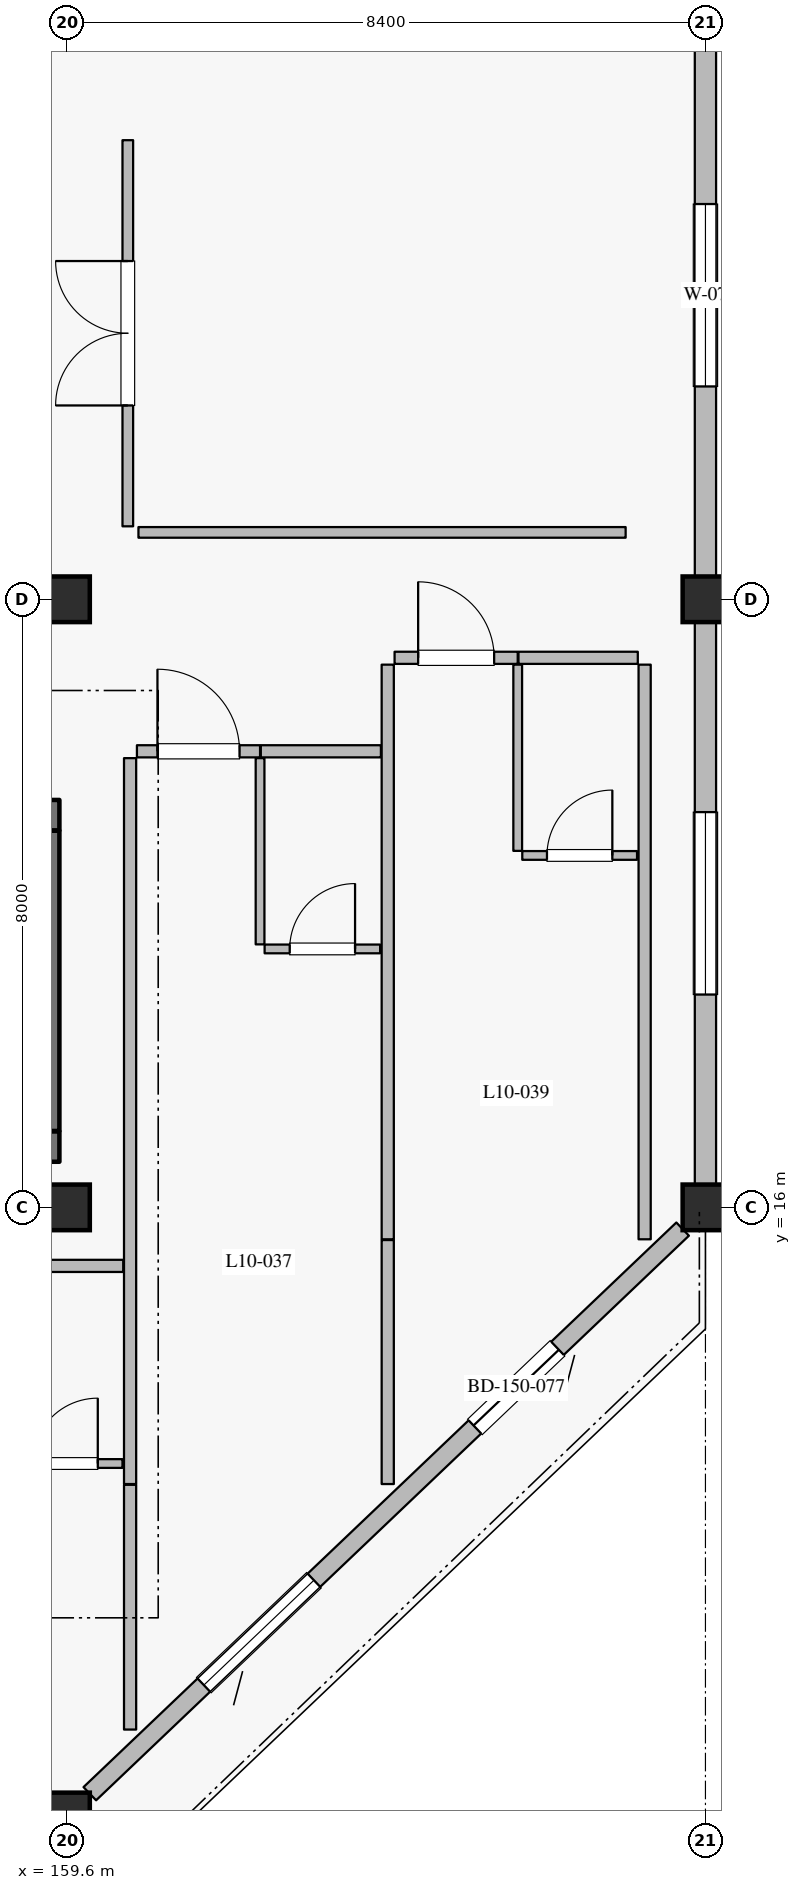
"""IFC4 building model, lengths in metres.
Left out: names, types, materials, properties, quantities, classifications, styles, units other than length and angle.
Written with IfcOpenShell. Run it as: python <this file> out.ifc"""

import sys

from ifc_helpers import new_model, si_unit, direction, frame, frame_2d, origin, origin_2d, place, context, subcontext, project, spatial, rectangle, extrude, element, fill, save


model = new_model("IFC4")
c1 = context("Model", 3, precision=1e-05, world=origin(), true_north=direction((0.0, 1.0)))
c2 = subcontext(c1, "Body", "Model", "MODEL_VIEW")
j1 = project(units=[si_unit("LENGTHUNIT", "METRE"), si_unit("PLANEANGLEUNIT", "RADIAN")], contexts=[c1])
p1 = place(None, origin())
s1 = spatial("IfcSite", under=j1, at=p1, CompositionType="ELEMENT")
p2 = place(p1, origin())
s2 = spatial("IfcBuilding", under=s1, at=p2, CompositionType="ELEMENT")
p3 = place(p2, frame((0.0, 0.0, 43.2)))
s3 = spatial("IfcBuildingStorey", under=s2, at=p3, CompositionType="ELEMENT", Elevation=43.2)
for number, where, z_axis, x_axis in (
    (1, (159.6, 8.0, 0.0), (0.0, 0.0, 1.0), (1.0, 0.0, 0.0)),
    (2, (159.6, 24.0, 0.0), (0.0, 0.0, 1.0), (1.0, 0.0, 0.0)),
    (3, (168.0, 16.0, 0.0), (0.0, 0.0, 1.0), (1.0, 0.0, 0.0)),
    (4, (159.6, 16.0, 0.0), (0.0, 0.0, 1.0), (1.0, 0.0, 0.0)),
    (5, (168.0, 24.0, 0.0), (0.0, 0.0, 1.0), (1.0, 0.0, 0.0)),
):
    element("IfcColumn", number, at=place(p3, frame(where, z_axis=z_axis, x_axis=x_axis)), inside=s3, PredefinedType="COLUMN", context=c2, shape_type="SweptSolid", body=[
        extrude(rectangle(XDim=0.6, YDim=0.6, at=origin_2d()), origin(), (0.0, 0.0, 1.0), 4.2),
    ])
p4 = place(p3, frame((167.7, 15.714, 0.0), z_axis=(0.0, 0.0, 1.0), x_axis=(-0.724156257633, -0.689635928973, 0.0)))
e6 = element("IfcWall", 6, at=p4, inside=s3, PredefinedType="SOLIDWALL", context=c2, shape_type="SweptSolid", body=[
    extrude(rectangle(XDim=10.771, YDim=0.24, at=frame_2d((5.386, 0.0))), origin(), (0.0, 0.0, 1.0), 3.49),
])
p5 = place(p4, frame((2.274, 0.0, 0.0)))
e7 = element("IfcOpeningElement", 7, at=p5, cuts=e6, PredefinedType="OPENING", context=c2, shape_type="SweptSolid", body=[
    extrude(rectangle(XDim=1.5, YDim=2.25, at=frame_2d((0.75, 1.125))), frame((0.0, 0.13, 0.0), z_axis=(0.0, -1.0, 0.0), x_axis=(1.0, 0.0, 0.0)), (0.0, 0.0, 1.0), 0.26),
])
p6 = place(p4, frame((6.699, 0.0, 0.8)))
e8 = element("IfcOpeningElement", 8, at=p6, cuts=e6, PredefinedType="OPENING", context=c2, shape_type="SweptSolid", body=[
    extrude(rectangle(XDim=2.0, YDim=1.75, at=frame_2d((1.0, 0.875))), frame((0.0, 0.13, 0.0), z_axis=(0.0, -1.0, 0.0), x_axis=(1.0, 0.0, 0.0)), (0.0, 0.0, 1.0), 0.26),
])
p7 = place(p3, frame((168.0, 31.7, 0.0), z_axis=(0.0, 0.0, 1.0), x_axis=(0.0, -1.0, 0.0)))
e9 = element("IfcWall", 9, at=p7, inside=s3, PredefinedType="SOLIDWALL", context=c2, shape_type="SweptSolid", body=[
    extrude(rectangle(XDim=7.4, YDim=0.28, at=frame_2d((3.7, 0.0))), origin(), (0.0, 0.0, 1.0), 3.3),
])
p8 = place(p7, frame((2.5, 0.0, 0.75)))
e10 = element("IfcOpeningElement", 10, at=p8, cuts=e9, PredefinedType="OPENING", context=c2, shape_type="SweptSolid", body=[
    extrude(rectangle(XDim=2.4, YDim=1.65, at=frame_2d((1.2, 0.825))), frame((0.0, 0.15, 0.0), z_axis=(0.0, -1.0, 0.0), x_axis=(1.0, 0.0, 0.0)), (0.0, 0.0, 1.0), 0.3),
])
p9 = place(p3, frame((168.0, 23.7, 0.0), z_axis=(0.0, 0.0, 1.0), x_axis=(0.0, -1.0, 0.0)))
e11 = element("IfcWall", 11, at=p9, inside=s3, PredefinedType="SOLIDWALL", context=c2, shape_type="SweptSolid", body=[
    extrude(rectangle(XDim=7.4, YDim=0.28, at=frame_2d((3.7, 0.0))), origin(), (0.0, 0.0, 1.0), 3.3),
])
p10 = place(p9, frame((2.5, 0.0, 0.75)))
e12 = element("IfcOpeningElement", 12, at=p10, cuts=e11, PredefinedType="OPENING", context=c2, shape_type="SweptSolid", body=[
    extrude(rectangle(XDim=2.4, YDim=1.65, at=frame_2d((1.2, 0.825))), frame((0.0, 0.15, 0.0), z_axis=(0.0, -1.0, 0.0), x_axis=(1.0, 0.0, 0.0)), (0.0, 0.0, 1.0), 0.3),
])
p11 = place(p3, frame((151.3, 16.8, 0.0), z_axis=(0.0, 0.0, 1.0), x_axis=(1.0, 0.0, 0.0)))
e13 = element("IfcWall", 13, at=p11, inside=s3, PredefinedType="SHEAR", context=c2, shape_type="SweptSolid", body=[
    extrude(rectangle(XDim=8.2, YDim=0.4, at=frame_2d((4.1, 0.0))), origin(), (0.0, 0.0, 1.0), 3.935),
])
p12 = place(p3, frame((159.3, 17.005, 0.0), z_axis=(0.0, 0.0, 1.0), x_axis=(0.0, 1.0, 0.0)))
e14 = element("IfcWall", 14, at=p12, inside=s3, PredefinedType="SHEAR", context=c2, shape_type="SweptSolid", body=[
    extrude(rectangle(XDim=3.95, YDim=0.4, at=frame_2d((1.975, 0.0))), origin(), (0.0, 0.0, 1.0), 3.935),
])
p13 = place(p3, frame((151.3, 21.16, 0.0), z_axis=(0.0, 0.0, 1.0), x_axis=(1.0, 0.0, 0.0)))
e15 = element("IfcWall", 15, at=p13, inside=s3, PredefinedType="SHEAR", context=c2, shape_type="SweptSolid", body=[
    extrude(rectangle(XDim=8.2, YDim=0.4, at=frame_2d((4.1, 0.0))), origin(), (0.0, 0.0, 1.0), 3.935),
])
p14 = place(p13, frame((0.43, 0.0, 0.0)))
e16 = element("IfcOpeningElement", 16, at=p14, cuts=e15, PredefinedType="OPENING", context=c2, shape_type="SweptSolid", body=[
    extrude(rectangle(XDim=1.16, YDim=2.2, at=frame_2d((0.58, 1.1))), frame((0.0, 0.21, 0.0), z_axis=(0.0, -1.0, 0.0), x_axis=(1.0, 0.0, 0.0)), (0.0, 0.0, 1.0), 0.42),
])
p15 = place(p3, frame((158.77, 15.23, 0.0), z_axis=(0.0, 0.0, 1.0), x_axis=(1.0, 0.0, 0.0)))
e17 = element("IfcWall", 17, at=p15, inside=s3, PredefinedType="PARTITIONING", context=c2, shape_type="SweptSolid", body=[
    extrude(rectangle(XDim=1.57, YDim=0.16, at=frame_2d((0.785, 0.0))), origin(), (0.0, 0.0, 1.0), 3.935),
])
p16 = place(p3, frame((158.82, 12.63, 0.0), z_axis=(0.0, 0.0, 1.0), x_axis=(1.0, 0.0, 0.0)))
e18 = element("IfcWall", 18, at=p16, inside=s3, PredefinedType="PARTITIONING", context=c2, shape_type="SweptSolid", body=[
    extrude(rectangle(XDim=1.51, YDim=0.115, at=frame_2d((0.755, 0.0))), origin(), (0.0, 0.0, 1.0), 3.935),
])
p17 = place(p16, frame((0.325, 0.0, 0.0)))
e19 = element("IfcOpeningElement", 19, at=p17, cuts=e18, PredefinedType="OPENING", context=c2, shape_type="SweptSolid", body=[
    extrude(rectangle(XDim=0.86, YDim=2.12, at=frame_2d((0.43, 1.06))), frame((0.0, 0.067, 0.0), z_axis=(0.0, -1.0, 0.0), x_axis=(1.0, 0.0, 0.0)), (0.0, 0.0, 1.0), 0.135),
])
p18 = place(p3, frame((160.43, 9.13, 0.0), z_axis=(0.0, 0.0, 1.0), x_axis=(0.0, 1.0, 0.0)))
e20 = element("IfcWall", 20, at=p18, inside=s3, PredefinedType="PARTITIONING", context=c2, shape_type="SweptSolid", body=[
    extrude(rectangle(XDim=3.22, YDim=0.16, at=frame_2d((1.61, 0.0))), origin(), (0.0, 0.0, 1.0), 3.935),
])
p19 = place(p3, frame((160.52, 22.0, 0.0), z_axis=(0.0, 0.0, 1.0), x_axis=(1.0, 0.0, 0.0)))
e21 = element("IfcWall", 21, at=p19, inside=s3, PredefinedType="PARTITIONING", context=c2, shape_type="SweptSolid", body=[
    extrude(rectangle(XDim=1.62, YDim=0.16, at=frame_2d((0.81, 0.0))), origin(), (0.0, 0.0, 1.0), 3.935),
])
p20 = place(p19, frame((0.27, 0.0, 0.0)))
e22 = element("IfcOpeningElement", 22, at=p20, cuts=e21, PredefinedType="OPENING", context=c2, shape_type="SweptSolid", body=[
    extrude(rectangle(XDim=1.08, YDim=2.3, at=frame_2d((0.54, 1.15))), frame((0.0, 0.09, 0.0), z_axis=(0.0, -1.0, 0.0), x_axis=(1.0, 0.0, 0.0)), (0.0, 0.0, 1.0), 0.18),
])
p21 = place(p3, frame((162.15, 22.0, 0.0), z_axis=(0.0, 0.0, 1.0), x_axis=(1.0, 0.0, 0.0)))
e23 = element("IfcWall", 23, at=p21, inside=s3, PredefinedType="PARTITIONING", context=c2, shape_type="SweptSolid", body=[
    extrude(rectangle(XDim=1.58, YDim=0.16, at=frame_2d((0.79, 0.0))), origin(), (0.0, 0.0, 1.0), 3.935),
])
p22 = place(p3, frame((162.14, 19.46, 0.0), z_axis=(0.0, 0.0, 1.0), x_axis=(0.0, 1.0, 0.0)))
e24 = element("IfcWall", 24, at=p22, inside=s3, PredefinedType="PARTITIONING", context=c2, shape_type="SweptSolid", body=[
    extrude(rectangle(XDim=2.45, YDim=0.115, at=frame_2d((1.225, 0.0))), origin(), (0.0, 0.0, 1.0), 3.935),
])
p23 = place(p3, frame((162.2, 19.4, 0.0), z_axis=(0.0, 0.0, 1.0), x_axis=(1.0, 0.0, 0.0)))
e25 = element("IfcWall", 25, at=p23, inside=s3, PredefinedType="PARTITIONING", context=c2, shape_type="SweptSolid", body=[
    extrude(rectangle(XDim=1.52, YDim=0.115, at=frame_2d((0.76, 0.0))), origin(), (0.0, 0.0, 1.0), 3.935),
])
p24 = place(p23, frame((0.33, 0.0, 0.0)))
e26 = element("IfcOpeningElement", 26, at=p24, cuts=e25, PredefinedType="OPENING", context=c2, shape_type="SweptSolid", body=[
    extrude(rectangle(XDim=0.86, YDim=2.12, at=frame_2d((0.43, 1.06))), frame((0.0, 0.067, 0.0), z_axis=(0.0, -1.0, 0.0), x_axis=(1.0, 0.0, 0.0)), (0.0, 0.0, 1.0), 0.135),
])
p25 = place(p3, frame((160.43, 12.36, 0.0), z_axis=(0.0, 0.0, 1.0), x_axis=(0.0, 1.0, 0.0)))
e27 = element("IfcWall", 27, at=p25, inside=s3, PredefinedType="PARTITIONING", context=c2, shape_type="SweptSolid", body=[
    extrude(rectangle(XDim=9.55, YDim=0.16, at=frame_2d((4.775, 0.0))), origin(), (0.0, 0.0, 1.0), 3.935),
])
p26 = place(p3, frame((163.82, 12.36, 0.0), z_axis=(0.0, 0.0, 1.0), x_axis=(0.0, 1.0, 0.0)))
e28 = element("IfcWall", 28, at=p26, inside=s3, PredefinedType="PARTITIONING", context=c2, shape_type="SweptSolid", body=[
    extrude(rectangle(XDim=3.21, YDim=0.16, at=frame_2d((1.605, 0.0))), origin(), (0.0, 0.0, 1.0), 3.935),
])
p27 = place(p3, frame((163.91, 23.23, 0.0), z_axis=(0.0, 0.0, 1.0), x_axis=(1.0, 0.0, 0.0)))
e29 = element("IfcWall", 29, at=p27, inside=s3, PredefinedType="PARTITIONING", context=c2, shape_type="SweptSolid", body=[
    extrude(rectangle(XDim=1.62, YDim=0.16, at=frame_2d((0.81, 0.0))), origin(), (0.0, 0.0, 1.0), 3.935),
])
p28 = place(p27, frame((0.31, 0.0, 0.0)))
e30 = element("IfcOpeningElement", 30, at=p28, cuts=e29, PredefinedType="OPENING", context=c2, shape_type="SweptSolid", body=[
    extrude(rectangle(XDim=1.0, YDim=2.25, at=frame_2d((0.5, 1.125))), frame((0.0, 0.09, 0.0), z_axis=(0.0, -1.0, 0.0), x_axis=(1.0, 0.0, 0.0)), (0.0, 0.0, 1.0), 0.18),
])
p29 = place(p3, frame((165.54, 23.23, 0.0), z_axis=(0.0, 0.0, 1.0), x_axis=(1.0, 0.0, 0.0)))
e31 = element("IfcWall", 31, at=p29, inside=s3, PredefinedType="PARTITIONING", context=c2, shape_type="SweptSolid", body=[
    extrude(rectangle(XDim=1.57, YDim=0.16, at=frame_2d((0.785, 0.0))), origin(), (0.0, 0.0, 1.0), 3.935),
])
p30 = place(p3, frame((165.53, 20.69, 0.0), z_axis=(0.0, 0.0, 1.0), x_axis=(0.0, 1.0, 0.0)))
e32 = element("IfcWall", 32, at=p30, inside=s3, PredefinedType="PARTITIONING", context=c2, shape_type="SweptSolid", body=[
    extrude(rectangle(XDim=2.45, YDim=0.115, at=frame_2d((1.225, 0.0))), origin(), (0.0, 0.0, 1.0), 3.935),
])
p31 = place(p3, frame((165.59, 20.63, 0.0), z_axis=(0.0, 0.0, 1.0), x_axis=(1.0, 0.0, 0.0)))
e33 = element("IfcWall", 33, at=p31, inside=s3, PredefinedType="PARTITIONING", context=c2, shape_type="SweptSolid", body=[
    extrude(rectangle(XDim=1.51, YDim=0.115, at=frame_2d((0.755, 0.0))), origin(), (0.0, 0.0, 1.0), 3.935),
])
p32 = place(p31, frame((0.325, 0.0, 0.0)))
e34 = element("IfcOpeningElement", 34, at=p32, cuts=e33, PredefinedType="OPENING", context=c2, shape_type="SweptSolid", body=[
    extrude(rectangle(XDim=0.86, YDim=2.12, at=frame_2d((0.43, 1.06))), frame((0.0, 0.067, 0.0), z_axis=(0.0, -1.0, 0.0), x_axis=(1.0, 0.0, 0.0)), (0.0, 0.0, 1.0), 0.135),
])
for number, where, z_axis, x_axis in (
    (35, (163.82, 15.58, 0.0), (0.0, 0.0, 1.0), (0.0, 1.0, 0.0)),
    (36, (167.2, 15.58, 0.0), (0.0, 0.0, 1.0), (0.0, 1.0, 0.0)),
):
    element("IfcWall", number, at=place(p3, frame(where, z_axis=z_axis, x_axis=x_axis)), inside=s3, PredefinedType="PARTITIONING", context=c2, shape_type="SweptSolid", body=[
        extrude(rectangle(XDim=7.56, YDim=0.16, at=frame_2d((3.78, 0.0))), origin(), (0.0, 0.0, 1.0), 3.935),
    ])
p33 = place(p3, frame((160.4, 24.96, 0.0), z_axis=(0.0, 0.0, 1.0), x_axis=(0.0, 1.0, 0.0)))
e37 = element("IfcWall", 37, at=p33, inside=s3, PredefinedType="PARTITIONING", context=c2, shape_type="SweptSolid", body=[
    extrude(rectangle(XDim=5.08, YDim=0.14, at=frame_2d((2.54, 0.0))), origin(), (0.0, 0.0, 1.0), 3.935),
])
p34 = place(p33, frame((1.59, 0.0, 0.0)))
e38 = element("IfcOpeningElement", 38, at=p34, cuts=e37, PredefinedType="OPENING", context=c2, shape_type="SweptSolid", body=[
    extrude(rectangle(XDim=1.9, YDim=2.4, at=frame_2d((0.95, 1.2))), frame((0.0, 0.08, 0.0), z_axis=(0.0, -1.0, 0.0), x_axis=(1.0, 0.0, 0.0)), (0.0, 0.0, 1.0), 0.16),
])
p35 = place(p3, frame((160.54, 24.88, 0.0), z_axis=(0.0, 0.0, 1.0), x_axis=(1.0, 0.0, 0.0)))
e39 = element("IfcWall", 39, at=p35, inside=s3, PredefinedType="PARTITIONING", context=c2, shape_type="SweptSolid", body=[
    extrude(rectangle(XDim=6.41, YDim=0.14, at=frame_2d((3.205, 0.0))), origin(), (0.0, 0.0, 1.0), 3.935),
])
p36 = place(p5, origin())
e40 = element("IfcDoor", 40, at=p36, inside=s3, OperationType="SLIDING_TO_LEFT", PredefinedType="DOOR", context=c2, shape_type="SweptSolid", body=[
    extrude(rectangle(XDim=1.5, YDim=2.25, at=frame_2d((0.75, 1.125))), frame((0.0, 0.025, 0.0), z_axis=(0.0, -1.0, 0.0), x_axis=(1.0, 0.0, 0.0)), (0.0, 0.0, 1.0), 0.05),
])
fill(e7, e40)
p37 = place(p6, origin())
e41 = element("IfcWindow", 41, at=p37, inside=s3, PartitioningType="DOUBLE_PANEL_VERTICAL", PredefinedType="WINDOW", context=c2, shape_type="SweptSolid", body=[
    extrude(rectangle(XDim=2.0, YDim=1.75, at=frame_2d((1.0, 0.875))), frame((0.0, 0.03, 0.0), z_axis=(0.0, -1.0, 0.0), x_axis=(1.0, 0.0, 0.0)), (0.0, 0.0, 1.0), 0.06),
])
fill(e8, e41)
p38 = place(p8, origin())
e42 = element("IfcWindow", 42, at=p38, inside=s3, PartitioningType="DOUBLE_PANEL_VERTICAL", PredefinedType="WINDOW", context=c2, shape_type="SweptSolid", body=[
    extrude(rectangle(XDim=2.4, YDim=1.65, at=frame_2d((1.2, 0.825))), frame((0.0, 0.03, 0.0), z_axis=(0.0, -1.0, 0.0), x_axis=(1.0, 0.0, 0.0)), (0.0, 0.0, 1.0), 0.06),
])
fill(e10, e42)
p39 = place(p10, origin())
e43 = element("IfcWindow", 43, at=p39, inside=s3, PartitioningType="DOUBLE_PANEL_VERTICAL", PredefinedType="WINDOW", context=c2, shape_type="SweptSolid", body=[
    extrude(rectangle(XDim=2.4, YDim=1.65, at=frame_2d((1.2, 0.825))), frame((0.0, 0.03, 0.0), z_axis=(0.0, -1.0, 0.0), x_axis=(1.0, 0.0, 0.0)), (0.0, 0.0, 1.0), 0.06),
])
fill(e12, e43)
p40 = place(p17, origin())
e44 = element("IfcDoor", 44, at=p40, inside=s3, OperationType="SINGLE_SWING_RIGHT", PredefinedType="DOOR", context=c2, shape_type="SweptSolid", body=[
    extrude(rectangle(XDim=0.86, YDim=2.12, at=frame_2d((0.43, 1.06))), frame((0.0, 0.025, 0.0), z_axis=(0.0, -1.0, 0.0), x_axis=(1.0, 0.0, 0.0)), (0.0, 0.0, 1.0), 0.05),
])
fill(e19, e44)
p41 = place(p20, origin())
e45 = element("IfcDoor", 45, at=p41, inside=s3, OperationType="SINGLE_SWING_LEFT", PredefinedType="DOOR", context=c2, shape_type="SweptSolid", body=[
    extrude(rectangle(XDim=1.08, YDim=2.3, at=frame_2d((0.54, 1.15))), frame((0.0, 0.025, 0.0), z_axis=(0.0, -1.0, 0.0), x_axis=(1.0, 0.0, 0.0)), (0.0, 0.0, 1.0), 0.05),
])
fill(e22, e45)
p42 = place(p24, origin())
e46 = element("IfcDoor", 46, at=p42, inside=s3, OperationType="SINGLE_SWING_RIGHT", PredefinedType="DOOR", context=c2, shape_type="SweptSolid", body=[
    extrude(rectangle(XDim=0.86, YDim=2.12, at=frame_2d((0.43, 1.06))), frame((0.0, 0.025, 0.0), z_axis=(0.0, -1.0, 0.0), x_axis=(1.0, 0.0, 0.0)), (0.0, 0.0, 1.0), 0.05),
])
fill(e26, e46)
p43 = place(p28, origin())
e47 = element("IfcDoor", 47, at=p43, inside=s3, OperationType="SINGLE_SWING_LEFT", PredefinedType="DOOR", context=c2, shape_type="SweptSolid", body=[
    extrude(rectangle(XDim=1.0, YDim=2.25, at=frame_2d((0.5, 1.125))), frame((0.0, 0.025, 0.0), z_axis=(0.0, -1.0, 0.0), x_axis=(1.0, 0.0, 0.0)), (0.0, 0.0, 1.0), 0.05),
])
fill(e30, e47)
p44 = place(p32, origin())
e48 = element("IfcDoor", 48, at=p44, inside=s3, OperationType="SINGLE_SWING_RIGHT", PredefinedType="DOOR", context=c2, shape_type="SweptSolid", body=[
    extrude(rectangle(XDim=0.86, YDim=2.12, at=frame_2d((0.43, 1.06))), frame((0.0, 0.025, 0.0), z_axis=(0.0, -1.0, 0.0), x_axis=(1.0, 0.0, 0.0)), (0.0, 0.0, 1.0), 0.05),
])
fill(e34, e48)
p45 = place(p34, origin())
e49 = element("IfcDoor", 49, at=p45, inside=s3, OperationType="DOUBLE_DOOR_SINGLE_SWING", PredefinedType="DOOR", context=c2, shape_type="SweptSolid", body=[
    extrude(rectangle(XDim=1.9, YDim=2.4, at=frame_2d((0.95, 1.2))), frame((0.0, 0.025, 0.0), z_axis=(0.0, -1.0, 0.0), x_axis=(1.0, 0.0, 0.0)), (0.0, 0.0, 1.0), 0.05),
])
fill(e38, e49)
save(model, sys.argv[1])
